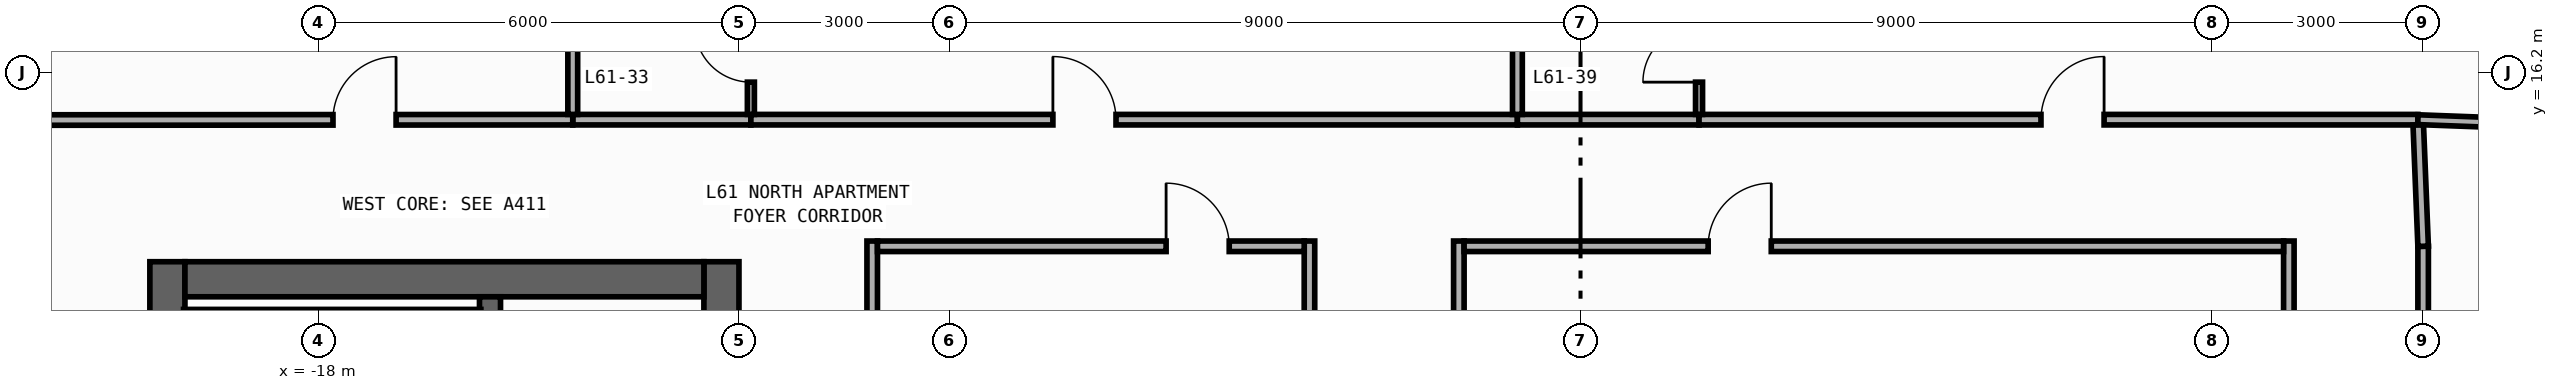
"""IFC4 building model, lengths in metres.
Left out: names, types, materials, properties, quantities, classifications, styles, units other than length and angle.
Written with IfcOpenShell. Run it as: python <this file> out.ifc"""

import sys

from ifc_helpers import new_model, si_unit, direction, frame, frame_2d, origin, place, context, subcontext, project, spatial, rectangle, extrude, element, fill, save


model = new_model("IFC4")
c1 = context("Model", 3, precision=1e-05, world=origin(), true_north=direction((0.0, 1.0)))
c2 = subcontext(c1, "Body", "Model", "MODEL_VIEW")
j1 = project(units=[si_unit("LENGTHUNIT", "METRE"), si_unit("PLANEANGLEUNIT", "RADIAN")], contexts=[c1])
p1 = place(None, origin())
s1 = spatial("IfcSite", under=j1, at=p1, CompositionType="ELEMENT")
p2 = place(p1, origin())
s2 = spatial("IfcBuilding", under=s1, at=p2, CompositionType="ELEMENT")
p3 = place(p2, frame((0.0, 0.0, 258.4)))
s3 = spatial("IfcBuildingStorey", under=s2, at=p3, CompositionType="ELEMENT", Elevation=258.4)
p4 = place(p3, frame((-20.15, -13.5, 0.0), z_axis=(0.0, 0.0, 1.0), x_axis=(0.0, 1.0, 0.0)))
e1 = element("IfcWall", 1, at=p4, inside=s3, PredefinedType="SHEAR", context=c2, shape_type="SweptSolid", body=[
    extrude(rectangle(XDim=27.0, YDim=0.5, at=frame_2d((13.5, 0.0))), origin(), (0.0, 0.0, 1.0), 3.34),
])
p5 = place(p3, frame((-12.25, -13.5, 0.0), z_axis=(0.0, 0.0, 1.0), x_axis=(0.0, 1.0, 0.0)))
e2 = element("IfcWall", 2, at=p5, inside=s3, PredefinedType="SHEAR", context=c2, shape_type="SweptSolid", body=[
    extrude(rectangle(XDim=27.0, YDim=0.5, at=frame_2d((13.5, 0.0))), origin(), (0.0, 0.0, 1.0), 3.34),
])
p6 = place(p5, frame((15.175, 0.0, 0.0)))
e3 = element("IfcOpeningElement", 3, at=p6, cuts=e2, PredefinedType="OPENING", context=c2, shape_type="SweptSolid", body=[
    extrude(rectangle(XDim=0.85, YDim=2.1, at=frame_2d((0.425, 1.05))), frame((0.0, 0.26, 0.0), z_axis=(0.0, -1.0, 0.0), x_axis=(1.0, 0.0, 0.0)), (0.0, 0.0, 1.0), 0.52),
])
p7 = place(p5, frame((21.275, 0.0, 0.0)))
e4 = element("IfcOpeningElement", 4, at=p7, cuts=e2, PredefinedType="OPENING", context=c2, shape_type="SweptSolid", body=[
    extrude(rectangle(XDim=0.85, YDim=2.1, at=frame_2d((0.425, 1.05))), frame((0.0, 0.26, 0.0), z_axis=(0.0, -1.0, 0.0), x_axis=(1.0, 0.0, 0.0)), (0.0, 0.0, 1.0), 0.52),
])
p8 = place(p5, frame((4.275, 0.0, 0.0)))
e5 = element("IfcOpeningElement", 5, at=p8, cuts=e2, PredefinedType="OPENING", context=c2, shape_type="SweptSolid", body=[
    extrude(rectangle(XDim=0.85, YDim=2.1, at=frame_2d((0.425, 1.05))), frame((0.0, 0.26, 0.0), z_axis=(0.0, -1.0, 0.0), x_axis=(1.0, 0.0, 0.0)), (0.0, 0.0, 1.0), 0.52),
])
p9 = place(p5, frame((10.275, 0.0, 0.0)))
e6 = element("IfcOpeningElement", 6, at=p9, cuts=e2, PredefinedType="OPENING", context=c2, shape_type="SweptSolid", body=[
    extrude(rectangle(XDim=0.85, YDim=2.1, at=frame_2d((0.425, 1.05))), frame((0.0, 0.26, 0.0), z_axis=(0.0, -1.0, 0.0), x_axis=(1.0, 0.0, 0.0)), (0.0, 0.0, 1.0), 0.52),
])
p10 = place(p5, frame((12.725, 0.0, 0.0)))
e7 = element("IfcOpeningElement", 7, at=p10, cuts=e2, PredefinedType="OPENING", context=c2, shape_type="SweptSolid", body=[
    extrude(rectangle(XDim=1.15, YDim=2.2, at=frame_2d((0.575, 1.1))), frame((0.0, 0.26, 0.0), z_axis=(0.0, -1.0, 0.0), x_axis=(1.0, 0.0, 0.0)), (0.0, 0.0, 1.0), 0.52),
])
p11 = place(p5, frame((1.625, 0.0, 0.0)))
e8 = element("IfcOpeningElement", 8, at=p11, cuts=e2, PredefinedType="OPENING", context=c2, shape_type="SweptSolid", body=[
    extrude(rectangle(XDim=0.85, YDim=2.1, at=frame_2d((0.425, 1.05))), frame((0.0, 0.26, 0.0), z_axis=(0.0, -1.0, 0.0), x_axis=(1.0, 0.0, 0.0)), (0.0, 0.0, 1.0), 0.52),
])
p12 = place(p3, frame((-19.9, 13.25, 0.0), z_axis=(0.0, 0.0, 1.0), x_axis=(1.0, 0.0, 0.0)))
e9 = element("IfcWall", 9, at=p12, inside=s3, PredefinedType="SHEAR", context=c2, shape_type="SweptSolid", body=[
    extrude(rectangle(XDim=7.4, YDim=0.5, at=frame_2d((3.7, 0.0))), origin(), (0.0, 0.0, 1.0), 3.34),
])
p13 = place(p3, frame((-15.55, -13.0, 0.0), z_axis=(0.0, 0.0, 1.0), x_axis=(0.0, 1.0, 0.0)))
e10 = element("IfcWall", 10, at=p13, inside=s3, PredefinedType="SHEAR", context=c2, shape_type="SweptSolid", body=[
    extrude(rectangle(XDim=26.0, YDim=0.3, at=frame_2d((13.0, 0.0))), origin(), (0.0, 0.0, 1.0), 3.34),
])
p14 = place(p13, frame((12.225, 0.0, 0.0)))
e11 = element("IfcOpeningElement", 11, at=p14, cuts=e10, PredefinedType="OPENING", context=c2, shape_type="SweptSolid", body=[
    extrude(rectangle(XDim=1.15, YDim=2.2, at=frame_2d((0.575, 1.1))), frame((0.0, 0.16, 0.0), z_axis=(0.0, -1.0, 0.0), x_axis=(1.0, 0.0, 0.0)), (0.0, 0.0, 1.0), 0.32),
])
p15 = place(p13, frame((1.125, 0.0, 0.0)))
e12 = element("IfcOpeningElement", 12, at=p15, cuts=e10, PredefinedType="OPENING", context=c2, shape_type="SweptSolid", body=[
    extrude(rectangle(XDim=0.85, YDim=2.1, at=frame_2d((0.425, 1.05))), frame((0.0, 0.16, 0.0), z_axis=(0.0, -1.0, 0.0), x_axis=(1.0, 0.0, 0.0)), (0.0, 0.0, 1.0), 0.32),
])
p16 = place(p3, frame((-19.92, 12.71, 0.0), z_axis=(0.0, 0.0, 1.0), x_axis=(1.0, 0.0, 0.0)))
e13 = element("IfcWall", 13, at=p16, inside=s3, PredefinedType="SHEAR", context=c2, shape_type="SweptSolid", body=[
    extrude(rectangle(XDim=4.24, YDim=0.22, at=frame_2d((2.12, 0.0))), origin(), (0.0, 0.0, 1.0), 3.34),
])
p17 = place(p3, frame((-10.1, -1.61, 0.0), z_axis=(0.0, 0.0, 1.0), x_axis=(0.0, 1.0, 0.0)))
e14 = element("IfcWall", 14, at=p17, inside=s3, PredefinedType="PARTITIONING", context=c2, shape_type="SweptSolid", body=[
    extrude(rectangle(XDim=15.405, YDim=0.15, at=frame_2d((7.703, 0.0))), origin(), (0.0, 0.0, 1.0), 3.34),
])
p18 = place(p17, frame((6.543, 0.0, 0.0)))
e15 = element("IfcOpeningElement", 15, at=p18, cuts=e14, PredefinedType="OPENING", context=c2, shape_type="SweptSolid", body=[
    extrude(rectangle(XDim=0.9, YDim=2.15, at=frame_2d((0.45, 1.075))), frame((0.0, 0.085, 0.0), z_axis=(0.0, -1.0, 0.0), x_axis=(1.0, 0.0, 0.0)), (0.0, 0.0, 1.0), 0.17),
])
p19 = place(p3, frame((12.015, 7.2, 0.0), z_axis=(0.0, 0.0, 1.0), x_axis=(0.0, 1.0, 0.0)))
e16 = element("IfcWall", 16, at=p19, inside=s3, PredefinedType="PARTITIONING", context=c2, shape_type="SweptSolid", body=[
    extrude(rectangle(XDim=6.52, YDim=0.15, at=frame_2d((3.26, 0.0))), origin(), (0.0, 0.0, 1.0), 3.34),
])
p20 = place(p19, frame((0.67, 0.0, 0.0)))
e17 = element("IfcOpeningElement", 17, at=p20, cuts=e16, PredefinedType="OPENING", context=c2, shape_type="SweptSolid", body=[
    extrude(rectangle(XDim=0.9, YDim=2.15, at=frame_2d((0.45, 1.075))), frame((0.0, 0.085, 0.0), z_axis=(0.0, -1.0, 0.0), x_axis=(1.0, 0.0, 0.0)), (0.0, 0.0, 1.0), 0.17),
])
p21 = place(p3, frame((10.1, -1.61, 0.0), z_axis=(0.0, 0.0, 1.0), x_axis=(0.0, 1.0, 0.0)))
e18 = element("IfcWall", 18, at=p21, inside=s3, PredefinedType="PARTITIONING", context=c2, shape_type="SweptSolid", body=[
    extrude(rectangle(XDim=15.405, YDim=0.15, at=frame_2d((7.703, 0.0))), origin(), (0.0, 0.0, 1.0), 3.34),
])
p22 = place(p21, frame((6.543, 0.0, 0.0)))
e19 = element("IfcOpeningElement", 19, at=p22, cuts=e18, PredefinedType="OPENING", context=c2, shape_type="SweptSolid", body=[
    extrude(rectangle(XDim=0.9, YDim=2.15, at=frame_2d((0.45, 1.075))), frame((0.0, 0.085, 0.0), z_axis=(0.0, -1.0, 0.0), x_axis=(1.0, 0.0, 0.0)), (0.0, 0.0, 1.0), 0.17),
])
p23 = place(p3, frame((-3.865, -1.46, 0.0), z_axis=(0.0, 0.0, 1.0), x_axis=(0.0, 1.0, 0.0)))
e20 = element("IfcWall", 20, at=p23, inside=s3, PredefinedType="PARTITIONING", context=c2, shape_type="SweptSolid", body=[
    extrude(rectangle(XDim=15.255, YDim=0.15, at=frame_2d((7.627, 0.0))), origin(), (0.0, 0.0, 1.0), 3.34),
])
p24 = place(p23, frame((6.476, 0.0, 0.0)))
e21 = element("IfcOpeningElement", 21, at=p24, cuts=e20, PredefinedType="OPENING", context=c2, shape_type="SweptSolid", body=[
    extrude(rectangle(XDim=0.9, YDim=2.15, at=frame_2d((0.45, 1.075))), frame((0.0, 0.085, 0.0), z_axis=(0.0, -1.0, 0.0), x_axis=(1.0, 0.0, 0.0)), (0.0, 0.0, 1.0), 0.17),
])
p25 = place(p3, frame((-1.735, -1.46, 0.0), z_axis=(0.0, 0.0, 1.0), x_axis=(0.0, 1.0, 0.0)))
e22 = element("IfcWall", 22, at=p25, inside=s3, PredefinedType="PARTITIONING", context=c2, shape_type="SweptSolid", body=[
    extrude(rectangle(XDim=15.255, YDim=0.15, at=frame_2d((7.627, 0.0))), origin(), (0.0, 0.0, 1.0), 3.34),
])
p26 = place(p25, frame((6.476, 0.0, 0.0)))
e23 = element("IfcOpeningElement", 23, at=p26, cuts=e22, PredefinedType="OPENING", context=c2, shape_type="SweptSolid", body=[
    extrude(rectangle(XDim=0.9, YDim=2.15, at=frame_2d((0.45, 1.075))), frame((0.0, 0.085, 0.0), z_axis=(0.0, -1.0, 0.0), x_axis=(1.0, 0.0, 0.0)), (0.0, 0.0, 1.0), 0.17),
])
p27 = place(p3, frame((-14.37, 15.525, 0.0), z_axis=(0.0, 0.0, 1.0), x_axis=(1.0, 0.0, 0.0)))
e24 = element("IfcWall", 24, at=p27, inside=s3, PredefinedType="PARTITIONING", context=c2, shape_type="SweptSolid", body=[
    extrude(rectangle(XDim=2.54, YDim=0.15, at=frame_2d((1.27, 0.0))), origin(), (0.0, 0.0, 1.0), 3.34),
])
p28 = place(p3, frame((-11.83, 15.525, 0.0), z_axis=(0.0, 0.0, 1.0), x_axis=(1.0, 0.0, 0.0)))
e25 = element("IfcWall", 25, at=p28, inside=s3, PredefinedType="PARTITIONING", context=c2, shape_type="SweptSolid", body=[
    extrude(rectangle(XDim=10.93, YDim=0.15, at=frame_2d((5.465, 0.0))), origin(), (0.0, 0.0, 1.0), 3.34),
])
p29 = place(p28, frame((4.306, 0.0, 0.0)))
e26 = element("IfcOpeningElement", 26, at=p29, cuts=e25, PredefinedType="OPENING", context=c2, shape_type="SweptSolid", body=[
    extrude(rectangle(XDim=0.9, YDim=2.15, at=frame_2d((0.45, 1.075))), frame((0.0, 0.085, 0.0), z_axis=(0.0, -1.0, 0.0), x_axis=(1.0, 0.0, 0.0)), (0.0, 0.0, 1.0), 0.17),
])
p30 = place(p3, frame((-0.9, 15.525, 0.0), z_axis=(0.0, 0.0, 1.0), x_axis=(1.0, 0.0, 0.0)))
e27 = element("IfcWall", 27, at=p30, inside=s3, PredefinedType="PARTITIONING", context=c2, shape_type="SweptSolid", body=[
    extrude(rectangle(XDim=2.59, YDim=0.15, at=frame_2d((1.295, 0.0))), origin(), (0.0, 0.0, 1.0), 3.34),
])
p31 = place(p3, frame((1.69, 15.525, 0.0), z_axis=(0.0, 0.0, 1.0), x_axis=(1.0, 0.0, 0.0)))
e28 = element("IfcWall", 28, at=p31, inside=s3, PredefinedType="PARTITIONING", context=c2, shape_type="SweptSolid", body=[
    extrude(rectangle(XDim=10.25, YDim=0.15, at=frame_2d((5.125, 0.0))), origin(), (0.0, 0.0, 1.0), 3.34),
])
p32 = place(p31, frame((4.876, 0.0, 0.0)))
e29 = element("IfcOpeningElement", 29, at=p32, cuts=e28, PredefinedType="OPENING", context=c2, shape_type="SweptSolid", body=[
    extrude(rectangle(XDim=0.9, YDim=2.15, at=frame_2d((0.45, 1.075))), frame((0.0, 0.085, 0.0), z_axis=(0.0, -1.0, 0.0), x_axis=(1.0, 0.0, 0.0)), (0.0, 0.0, 1.0), 0.17),
])
p33 = place(p3, frame((12.015, 13.72, 0.0), z_axis=(0.0, 0.0, 1.0), x_axis=(-0.040046877756, 0.99919780203, 0.0)))
e30 = element("IfcWall", 30, at=p33, inside=s3, PredefinedType="PARTITIONING", context=c2, shape_type="SweptSolid", body=[
    extrude(rectangle(XDim=1.731, YDim=0.15, at=frame_2d((0.866, 0.0))), origin(), (0.0, 0.0, 1.0), 3.34),
])
p34 = place(p3, frame((-21.955, 15.52, 0.0), z_axis=(0.0, 0.0, 1.0), x_axis=(0.999999792794, 0.000643749062, 0.0)))
e31 = element("IfcWall", 31, at=p34, inside=s3, PredefinedType="PARTITIONING", context=c2, shape_type="SweptSolid", body=[
    extrude(rectangle(XDim=7.585, YDim=0.15, at=frame_2d((3.792, 0.0))), origin(), (0.0, 0.0, 1.0), 3.34),
])
p35 = place(p34, frame((4.166, 0.0, 0.0)))
e32 = element("IfcOpeningElement", 32, at=p35, cuts=e31, PredefinedType="OPENING", context=c2, shape_type="SweptSolid", body=[
    extrude(rectangle(XDim=0.9, YDim=2.15, at=frame_2d((0.45, 1.075))), frame((0.0, 0.085, 0.0), z_axis=(0.0, -1.0, 0.0), x_axis=(1.0, 0.0, 0.0)), (0.0, 0.0, 1.0), 0.17),
])
p36 = place(p3, frame((-10.025, 13.72, 0.0), z_axis=(0.0, 0.0, 1.0), x_axis=(1.0, 0.0, 0.0)))
e33 = element("IfcWall", 33, at=p36, inside=s3, PredefinedType="PARTITIONING", context=c2, shape_type="SweptSolid", body=[
    extrude(rectangle(XDim=6.085, YDim=0.15, at=frame_2d((3.042, 0.0))), origin(), (0.0, 0.0, 1.0), 3.34),
])
p37 = place(p36, frame((4.116, 0.0, 0.0)))
e34 = element("IfcOpeningElement", 34, at=p37, cuts=e33, PredefinedType="OPENING", context=c2, shape_type="SweptSolid", body=[
    extrude(rectangle(XDim=0.9, YDim=2.15, at=frame_2d((0.45, 1.075))), frame((0.0, 0.085, 0.0), z_axis=(0.0, -1.0, 0.0), x_axis=(1.0, 0.0, 0.0)), (0.0, 0.0, 1.0), 0.17),
])
p38 = place(p3, frame((-1.66, 13.72, 0.0), z_axis=(0.0, 0.0, 1.0), x_axis=(1.0, 0.0, 0.0)))
e35 = element("IfcWall", 35, at=p38, inside=s3, PredefinedType="PARTITIONING", context=c2, shape_type="SweptSolid", body=[
    extrude(rectangle(XDim=11.685, YDim=0.15, at=frame_2d((5.842, 0.0))), origin(), (0.0, 0.0, 1.0), 3.34),
])
p39 = place(p38, frame((3.48, 0.0, 0.0)))
e36 = element("IfcOpeningElement", 36, at=p39, cuts=e35, PredefinedType="OPENING", context=c2, shape_type="SweptSolid", body=[
    extrude(rectangle(XDim=0.9, YDim=2.15, at=frame_2d((0.45, 1.075))), frame((0.0, 0.085, 0.0), z_axis=(0.0, -1.0, 0.0), x_axis=(1.0, 0.0, 0.0)), (0.0, 0.0, 1.0), 0.17),
])
p40 = place(p3, frame((-11.83, 15.6, 0.0), z_axis=(0.0, 0.0, 1.0), x_axis=(0.0, 1.0, 0.0)))
e37 = element("IfcWall", 37, at=p40, inside=s3, PredefinedType="PARTITIONING", context=c2, shape_type="SweptSolid", body=[
    extrude(rectangle(XDim=2.5, YDim=0.1, at=frame_2d((1.25, 0.0))), origin(), (0.0, 0.0, 1.0), 3.34),
])
p41 = place(p40, frame((0.46, 0.0, 0.0)))
e38 = element("IfcOpeningElement", 38, at=p41, cuts=e37, PredefinedType="OPENING", context=c2, shape_type="SweptSolid", body=[
    extrude(rectangle(XDim=0.8, YDim=2.1, at=frame_2d((0.4, 1.05))), frame((0.0, 0.06, 0.0), z_axis=(0.0, -1.0, 0.0), x_axis=(1.0, 0.0, 0.0)), (0.0, 0.0, 1.0), 0.12),
])
for number, where, z_axis, x_axis in (
    (39, (-14.37, 15.6, 0.0), (0.0, 0.0, 1.0), (0.0, 1.0, 0.0)),
    (40, (-0.9, 15.6, 0.0), (0.0, 0.0, 1.0), (0.0, 1.0, 0.0)),
):
    element("IfcWall", number, at=place(p3, frame(where, z_axis=z_axis, x_axis=x_axis)), inside=s3, PredefinedType="PARTITIONING", context=c2, shape_type="SweptSolid", body=[
        extrude(rectangle(XDim=2.5, YDim=0.14, at=frame_2d((1.25, 0.0))), origin(), (0.0, 0.0, 1.0), 3.34),
    ])
p42 = place(p3, frame((1.69, 15.6, 0.0), z_axis=(0.0, 0.0, 1.0), x_axis=(0.0, 1.0, 0.0)))
e41 = element("IfcWall", 41, at=p42, inside=s3, PredefinedType="PARTITIONING", context=c2, shape_type="SweptSolid", body=[
    extrude(rectangle(XDim=2.5, YDim=0.1, at=frame_2d((1.25, 0.0))), origin(), (0.0, 0.0, 1.0), 3.34),
])
p43 = place(p42, frame((0.46, 0.0, 0.0)))
e42 = element("IfcOpeningElement", 42, at=p43, cuts=e41, PredefinedType="OPENING", context=c2, shape_type="SweptSolid", body=[
    extrude(rectangle(XDim=0.8, YDim=2.1, at=frame_2d((0.4, 1.05))), frame((0.0, 0.06, 0.0), z_axis=(0.0, -1.0, 0.0), x_axis=(1.0, 0.0, 0.0)), (0.0, 0.0, 1.0), 0.12),
])
p44 = place(p3, frame((11.94, 15.525, 0.0), z_axis=(0.0, 0.0, 1.0), x_axis=(0.999304229002, -0.037296888581, 0.0)))
e43 = element("IfcWall", 43, at=p44, inside=s3, PredefinedType="PARTITIONING", context=c2, shape_type="SweptSolid", body=[
    extrude(rectangle(XDim=1.741, YDim=0.14, at=frame_2d((0.871, 0.0))), origin(), (0.0, 0.0, 1.0), 3.34),
])
p45 = place(p29, origin())
e44 = element("IfcDoor", 44, at=p45, inside=s3, OperationType="SINGLE_SWING_LEFT", PredefinedType="DOOR", context=c2, shape_type="SweptSolid", body=[
    extrude(rectangle(XDim=0.9, YDim=2.15, at=frame_2d((0.45, 1.075))), frame((0.0, 0.025, 0.0), z_axis=(0.0, -1.0, 0.0), x_axis=(1.0, 0.0, 0.0)), (0.0, 0.0, 1.0), 0.05),
])
fill(e26, e44)
p46 = place(p32, origin())
e45 = element("IfcDoor", 45, at=p46, inside=s3, OperationType="SINGLE_SWING_RIGHT", PredefinedType="DOOR", context=c2, shape_type="SweptSolid", body=[
    extrude(rectangle(XDim=0.9, YDim=2.15, at=frame_2d((0.45, 1.075))), frame((0.0, 0.025, 0.0), z_axis=(0.0, -1.0, 0.0), x_axis=(1.0, 0.0, 0.0)), (0.0, 0.0, 1.0), 0.05),
])
fill(e29, e45)
p47 = place(p35, origin())
e46 = element("IfcDoor", 46, at=p47, inside=s3, OperationType="SINGLE_SWING_RIGHT", PredefinedType="DOOR", context=c2, shape_type="SweptSolid", body=[
    extrude(rectangle(XDim=0.9, YDim=2.15, at=frame_2d((0.45, 1.075))), frame((0.0, 0.025, 0.0), z_axis=(0.0, -1.0, 0.0), x_axis=(1.0, 0.0, 0.0)), (0.0, 0.0, 1.0), 0.05),
])
fill(e32, e46)
p48 = place(p37, origin())
e47 = element("IfcDoor", 47, at=p48, inside=s3, OperationType="SINGLE_SWING_LEFT", PredefinedType="DOOR", context=c2, shape_type="SweptSolid", body=[
    extrude(rectangle(XDim=0.9, YDim=2.15, at=frame_2d((0.45, 1.075))), frame((0.0, 0.025, 0.0), z_axis=(0.0, -1.0, 0.0), x_axis=(1.0, 0.0, 0.0)), (0.0, 0.0, 1.0), 0.05),
])
fill(e34, e47)
p49 = place(p39, origin())
e48 = element("IfcDoor", 48, at=p49, inside=s3, OperationType="SINGLE_SWING_RIGHT", PredefinedType="DOOR", context=c2, shape_type="SweptSolid", body=[
    extrude(rectangle(XDim=0.9, YDim=2.15, at=frame_2d((0.45, 1.075))), frame((0.0, 0.025, 0.0), z_axis=(0.0, -1.0, 0.0), x_axis=(1.0, 0.0, 0.0)), (0.0, 0.0, 1.0), 0.05),
])
fill(e36, e48)
p50 = place(p41, origin())
e49 = element("IfcDoor", 49, at=p50, inside=s3, OperationType="SINGLE_SWING_RIGHT", PredefinedType="DOOR", context=c2, shape_type="SweptSolid", body=[
    extrude(rectangle(XDim=0.8, YDim=2.1, at=frame_2d((0.4, 1.05))), frame((0.0, 0.025, 0.0), z_axis=(0.0, -1.0, 0.0), x_axis=(1.0, 0.0, 0.0)), (0.0, 0.0, 1.0), 0.05),
])
fill(e38, e49)
p51 = place(p43, origin())
e50 = element("IfcDoor", 50, at=p51, inside=s3, OperationType="SINGLE_SWING_LEFT", PredefinedType="DOOR", context=c2, shape_type="SweptSolid", body=[
    extrude(rectangle(XDim=0.8, YDim=2.1, at=frame_2d((0.4, 1.05))), frame((0.0, 0.025, 0.0), z_axis=(0.0, -1.0, 0.0), x_axis=(1.0, 0.0, 0.0)), (0.0, 0.0, 1.0), 0.05),
])
fill(e42, e50)
save(model, sys.argv[1])
